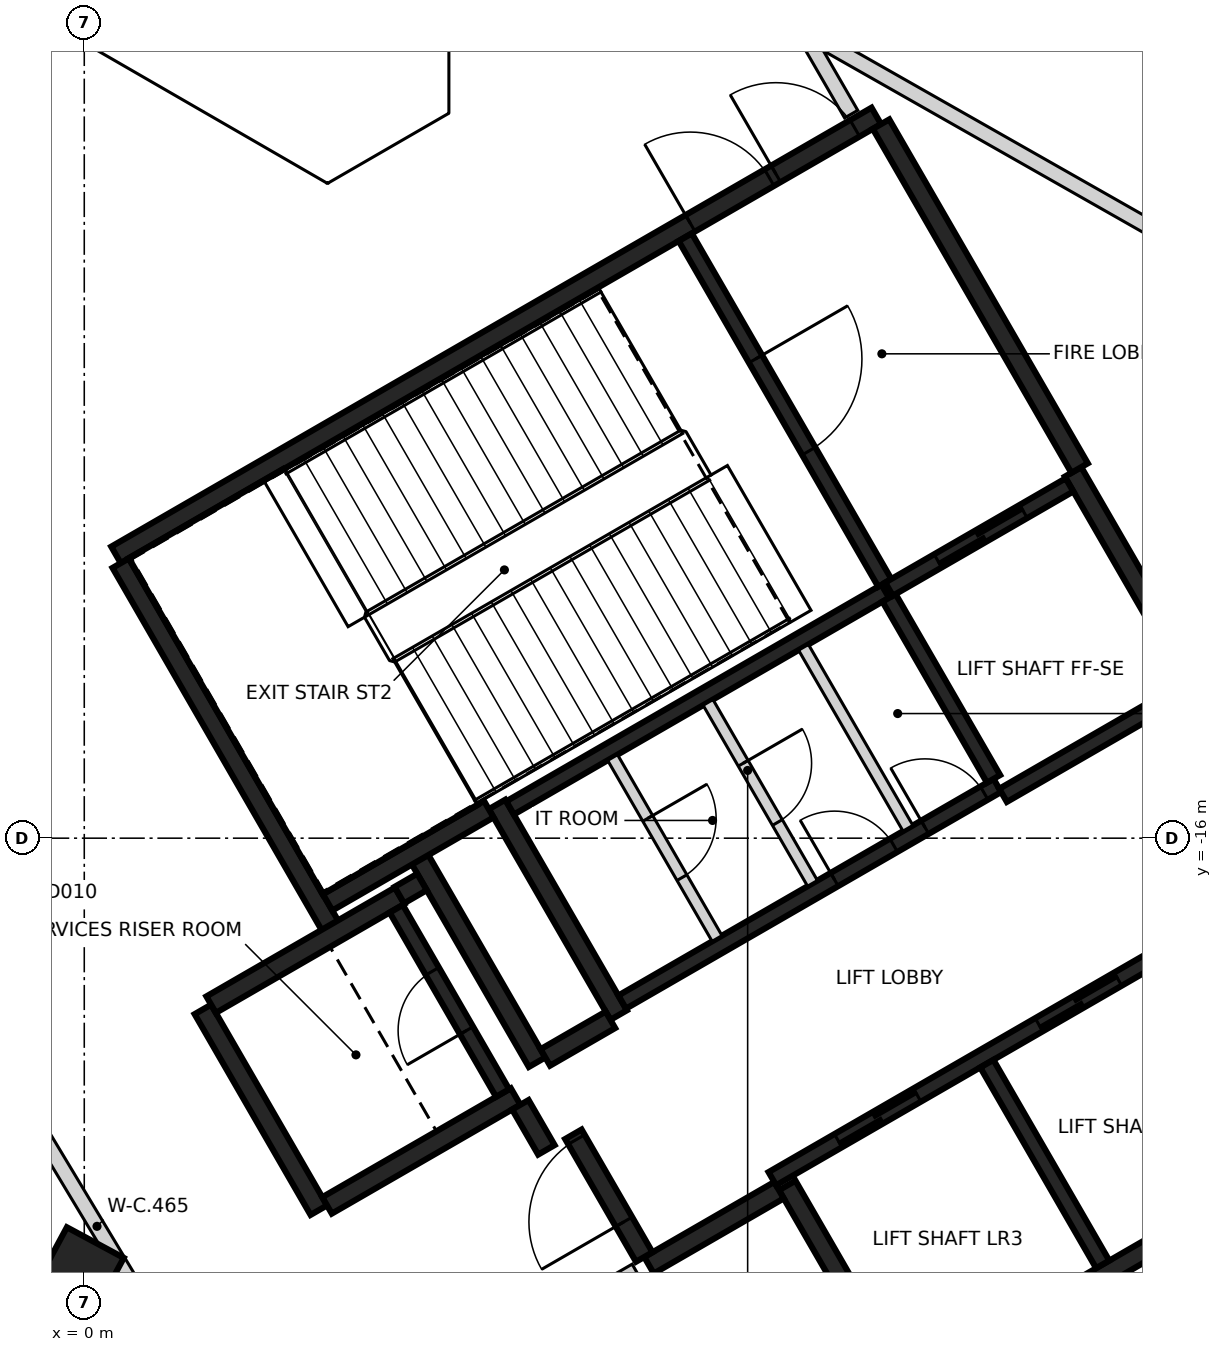
"""IFC4 building model, lengths in metres.
Left out: names, types, materials, properties, quantities, classifications, styles, units other than length and angle.
Written with IfcOpenShell. Run it as: python <this file> out.ifc"""

import sys

from ifc_helpers import new_model, si_unit, direction, frame, frame_2d, origin, origin_2d, place, context, subcontext, project, spatial, rectangle, extrude, element, fill, save


model = new_model("IFC4")
c1 = context("Model", 3, precision=1e-05, world=origin(), true_north=direction((0.0, 1.0)))
c2 = subcontext(c1, "Body", "Model", "MODEL_VIEW")
j1 = project(units=[si_unit("LENGTHUNIT", "METRE"), si_unit("PLANEANGLEUNIT", "RADIAN")], contexts=[c1])
p1 = place(None, origin())
s1 = spatial("IfcSite", under=j1, at=p1, CompositionType="ELEMENT")
p2 = place(p1, origin())
s2 = spatial("IfcBuilding", under=s1, at=p2, CompositionType="ELEMENT")
p3 = place(p2, frame((0.0, 0.0, 123.8)))
s3 = spatial("IfcBuildingStorey", under=s2, at=p3, CompositionType="ELEMENT", Elevation=123.8)
p4 = place(p3, frame((-0.151, -21.871, -0.4), z_axis=(0.0, 0.0, 1.0), x_axis=(0.47387612754, 0.880591514692, 0.0)))
e1 = element("IfcColumn", 1, at=p4, inside=s3, PredefinedType="COLUMN", context=c2, shape_type="SweptSolid", body=[
    extrude(rectangle(XDim=1.25, YDim=0.85, at=origin_2d()), origin(), (0.0, 0.0, 1.0), 5.0),
])
p5 = place(p3, frame((0.417, -12.273, 0.0), z_axis=(0.0, 0.0, 1.0), x_axis=(0.866021906294, 0.500006057782, 0.0)))
e2 = element("IfcWall", 2, at=p5, inside=s3, PredefinedType="SHEAR", context=c2, shape_type="SweptSolid", body=[
    extrude(rectangle(XDim=11.55, YDim=0.25, at=frame_2d((5.775, 0.0))), origin(), (0.0, 0.0, 1.0), 4.6),
])
p6 = place(p5, frame((10.025, 0.0, 0.0)))
e3 = element("IfcOpeningElement", 3, at=p6, cuts=e2, PredefinedType="OPENING", context=c2, shape_type="SweptSolid", body=[
    extrude(rectangle(XDim=1.2, YDim=2.1, at=frame_2d((0.6, 1.05))), frame((0.0, 0.135, 0.0), z_axis=(0.0, -1.0, 0.0), x_axis=(1.0, 0.0, 0.0)), (0.0, 0.0, 1.0), 0.27),
])
p7 = place(p5, frame((8.725, 0.0, 0.0)))
e4 = element("IfcOpeningElement", 4, at=p7, cuts=e2, PredefinedType="OPENING", context=c2, shape_type="SweptSolid", body=[
    extrude(rectangle(XDim=1.2, YDim=2.1, at=frame_2d((0.6, 1.05))), frame((0.0, 0.135, 0.0), z_axis=(0.0, -1.0, 0.0), x_axis=(1.0, 0.0, 0.0)), (0.0, 0.0, 1.0), 0.27),
])
p8 = place(p3, frame((13.008, -11.181, 0.0), z_axis=(0.0, 0.0, 1.0), x_axis=(0.500004234368, -0.866022959057, 0.0)))
e5 = element("IfcWall", 5, at=p8, inside=s3, PredefinedType="SHEAR", context=c2, shape_type="SweptSolid", body=[
    extrude(rectangle(XDim=6.25, YDim=0.25, at=frame_2d((3.125, 0.0))), origin(), (0.0, 0.0, 1.0), 4.6),
])
p9 = place(p3, frame((15.865, -20.328, 0.0), z_axis=(0.0, 0.0, 1.0), x_axis=(-0.86602852612, -0.499994591916, 0.0)))
e6 = element("IfcWall", 6, at=p9, inside=s3, PredefinedType="SHEAR", context=c2, shape_type="SweptSolid", body=[
    extrude(rectangle(XDim=5.85, YDim=0.25, at=frame_2d((2.925, 0.0))), origin(), (0.0, 0.0, 1.0), 4.6),
])
p10 = place(p3, frame((3.235, -17.153, 0.0), z_axis=(0.0, 0.0, 1.0), x_axis=(-0.500008851346, 0.866020293397, 0.0)))
e7 = element("IfcWall", 7, at=p10, inside=s3, PredefinedType="SHEAR", context=c2, shape_type="SweptSolid", body=[
    extrude(rectangle(XDim=5.51, YDim=0.25, at=frame_2d((2.755, 0.0))), origin(), (0.0, 0.0, 1.0), 4.6),
])
p11 = place(p3, frame((10.483, -6.606, 0.0), z_axis=(0.0, 0.0, 1.0), x_axis=(0.49999885962, -0.866026062182, 0.0)))
e8 = element("IfcWall", 8, at=p11, inside=s3, PredefinedType="SHEAR", context=c2, shape_type="SweptSolid", body=[
    extrude(rectangle(XDim=5.225, YDim=0.25, at=frame_2d((2.612, 0.0))), origin(), (0.0, 0.0, 1.0), 4.6),
])
p12 = place(p3, frame((7.031, -18.327, 0.0), z_axis=(0.0, 0.0, 1.0), x_axis=(-0.499971222258, 0.866042017984, 0.0)))
e9 = element("IfcWall", 9, at=p12, inside=s3, PredefinedType="SHEAR", context=c2, shape_type="SweptSolid", body=[
    extrude(rectangle(XDim=3.2, YDim=0.25, at=frame_2d((1.6, 0.0))), origin(), (0.0, 0.0, 1.0), 4.6),
])
p13 = place(p3, frame((10.736, -23.145, 0.0), z_axis=(0.0, 0.0, 1.0), x_axis=(-0.500023226632, 0.866011993467, 0.0)))
e10 = element("IfcWall", 10, at=p13, inside=s3, PredefinedType="SHEAR", context=c2, shape_type="SweptSolid", body=[
    extrude(rectangle(XDim=2.974, YDim=0.25, at=frame_2d((1.487, 0.0))), origin(), (0.0, 0.0, 1.0), 4.6),
])
p14 = place(p3, frame((3.085, -20.894, 0.0), z_axis=(0.0, 0.0, 1.0), x_axis=(-0.499978833458, 0.866037623948, 0.0)))
e11 = element("IfcWall", 11, at=p14, inside=s3, PredefinedType="SHEAR", context=c2, shape_type="SweptSolid", body=[
    extrude(rectangle(XDim=3.05, YDim=0.25, at=frame_2d((1.525, 0.0))), origin(), (0.0, 0.0, 1.0), 4.6),
])
p15 = place(p3, frame((1.669, -18.19, 0.0), z_axis=(0.0, 0.0, 1.0), x_axis=(0.866042235819, 0.499970844928, 0.0)))
e12 = element("IfcWall", 12, at=p15, inside=s3, PredefinedType="SHEAR", context=c2, shape_type="SweptSolid", body=[
    extrude(rectangle(XDim=2.865, YDim=0.25, at=frame_2d((1.432, 0.0))), origin(), (0.0, 0.0, 1.0), 4.6),
])
p16 = place(p3, frame((5.675, -19.399, 0.0), z_axis=(0.0, 0.0, 1.0), x_axis=(-0.866026637627, -0.499997862916, 0.0)))
e13 = element("IfcWall", 13, at=p16, inside=s3, PredefinedType="SHEAR", context=c2, shape_type="SweptSolid", body=[
    extrude(rectangle(XDim=2.865, YDim=0.25, at=frame_2d((1.432, 0.0))), origin(), (0.0, 0.0, 1.0), 4.6),
])
p17 = place(p3, frame((4.414, -16.276, 0.0), z_axis=(0.0, 0.0, 1.0), x_axis=(0.500003324108, -0.866023484601, 0.0)))
e14 = element("IfcWall", 14, at=p17, inside=s3, PredefinedType="SHEAR", context=c2, shape_type="SweptSolid", body=[
    extrude(rectangle(XDim=3.085, YDim=0.25, at=frame_2d((1.542, 0.0))), origin(), (0.0, 0.0, 1.0), 4.6),
])
p18 = place(p3, frame((5.322, -15.619, 0.0), z_axis=(0.0, 0.0, 1.0), x_axis=(-0.866026229868, -0.499998569178, 0.0)))
e15 = element("IfcWall", 15, at=p18, inside=s3, PredefinedType="SHEAR", context=c2, shape_type="SweptSolid", body=[
    extrude(rectangle(XDim=2.449, YDim=0.25, at=frame_2d((1.225, 0.0))), origin(), (0.0, 0.0, 1.0), 4.6),
])
p19 = place(p3, frame((9.14, -20.631, 0.0), z_axis=(0.0, 0.0, 1.0), x_axis=(-0.866043531843, -0.499968599967, 0.0)))
e16 = element("IfcWall", 16, at=p19, inside=s3, PredefinedType="SHEAR", context=c2, shape_type="SweptSolid", body=[
    extrude(rectangle(XDim=1.975, YDim=0.25, at=frame_2d((0.987, 0.0))), origin(), (0.0, 0.0, 1.0), 4.6),
])
p20 = place(p3, frame((7.367, -21.51, 0.0), z_axis=(0.0, 0.0, 1.0), x_axis=(-0.499983108224, 0.866035156036, 0.0)))
e17 = element("IfcWall", 17, at=p20, inside=s3, PredefinedType="SHEAR", context=c2, shape_type="SweptSolid", body=[
    extrude(rectangle(XDim=1.865, YDim=0.25, at=frame_2d((0.932, 0.0))), origin(), (0.0, 0.0, 1.0), 4.6),
])
p21 = place(p20, frame((0.535, 0.0, 0.0)))
e18 = element("IfcOpeningElement", 18, at=p21, cuts=e17, PredefinedType="OPENING", context=c2, shape_type="SweptSolid", body=[
    extrude(rectangle(XDim=1.25, YDim=2.1, at=frame_2d((0.625, 1.05))), frame((0.0, 0.135, 0.0), z_axis=(0.0, -1.0, 0.0), x_axis=(1.0, 0.0, 0.0)), (0.0, 0.0, 1.0), 0.27),
])
p22 = place(p3, frame((6.065, -18.885, 0.0), z_axis=(0.0, 0.0, 1.0), x_axis=(0.866017078145, 0.500014420154, 0.0)))
e19 = element("IfcWall", 19, at=p22, inside=s3, PredefinedType="SHEAR", context=c2, shape_type="SweptSolid", body=[
    extrude(rectangle(XDim=0.989, YDim=0.25, at=frame_2d((0.495, 0.0))), origin(), (0.0, 0.0, 1.0), 4.6),
])
p23 = place(p3, frame((6.08, -20.1, 0.0), z_axis=(0.0, 0.0, 1.0), x_axis=(-0.500051773299, 0.865995510393, 0.0)))
e20 = element("IfcWall", 20, at=p23, inside=s3, PredefinedType="SHEAR", context=c2, shape_type="SweptSolid", body=[
    extrude(rectangle(XDim=0.685, YDim=0.25, at=frame_2d((0.342, 0.0))), origin(), (0.0, 0.0, 1.0), 4.6),
])
p24 = place(p3, frame((4.145, -16.749, 0.0), z_axis=(0.0, 0.0, 1.0), x_axis=(0.866185586049, 0.49972245349, 0.0)))
e21 = element("IfcWall", 21, at=p24, inside=s3, PredefinedType="SHEAR", context=c2, shape_type="SweptSolid", body=[
    extrude(rectangle(XDim=0.344, YDim=0.25, at=frame_2d((0.172, 0.0))), origin(), (0.0, 0.0, 1.0), 4.6),
])
p25 = place(p3, frame((9.052, -20.48, 0.0), z_axis=(0.0, 0.0, 1.0), x_axis=(0.866030299012, 0.499991521122, 0.0)))
e22 = element("IfcWall", 22, at=p25, inside=s3, PredefinedType="SHEAR", context=c2, shape_type="SweptSolid", body=[
    extrude(rectangle(XDim=6.1, YDim=0.2, at=frame_2d((3.05, 0.0))), origin(), (0.0, 0.0, 1.0), 4.6),
])
p26 = place(p25, frame((1.0, 0.0, 0.0)))
e23 = element("IfcOpeningElement", 23, at=p26, cuts=e22, PredefinedType="OPENING", context=c2, shape_type="SweptSolid", body=[
    extrude(rectangle(XDim=1.2, YDim=2.1, at=frame_2d((0.6, 1.05))), frame((0.0, 0.11, 0.0), z_axis=(0.0, -1.0, 0.0), x_axis=(1.0, 0.0, 0.0)), (0.0, 0.0, 1.0), 0.22),
])
p27 = place(p25, frame((4.05, 0.0, 0.0)))
e24 = element("IfcOpeningElement", 24, at=p27, cuts=e22, PredefinedType="OPENING", context=c2, shape_type="SweptSolid", body=[
    extrude(rectangle(XDim=1.2, YDim=2.1, at=frame_2d((0.6, 1.05))), frame((0.0, 0.11, 0.0), z_axis=(0.0, -1.0, 0.0), x_axis=(1.0, 0.0, 0.0)), (0.0, 0.0, 1.0), 0.22),
])
p28 = place(p3, frame((10.538, -12.752, 0.0), z_axis=(0.0, 0.0, 1.0), x_axis=(-0.866038630372, -0.499977090179, 0.0)))
e25 = element("IfcWall", 25, at=p28, inside=s3, PredefinedType="SHEAR", context=c2, shape_type="SweptSolid", body=[
    extrude(rectangle(XDim=5.699, YDim=0.2, at=frame_2d((2.85, 0.0))), origin(), (0.0, 0.0, 1.0), 4.6),
])
p29 = place(p3, frame((7.077, -18.156, 0.0), z_axis=(0.0, 0.0, 1.0), x_axis=(0.866038630372, 0.499977090179, 0.0)))
e26 = element("IfcWall", 26, at=p29, inside=s3, PredefinedType="SHEAR", context=c2, shape_type="SweptSolid", body=[
    extrude(rectangle(XDim=5.699, YDim=0.2, at=frame_2d((2.85, 0.0))), origin(), (0.0, 0.0, 1.0), 4.6),
])
p30 = place(p29, frame((3.224, 0.0, 0.0)))
e27 = element("IfcOpeningElement", 27, at=p30, cuts=e26, PredefinedType="OPENING", context=c2, shape_type="SweptSolid", body=[
    extrude(rectangle(XDim=0.9, YDim=2.1, at=frame_2d((0.45, 1.05))), frame((0.0, 0.11, 0.0), z_axis=(0.0, -1.0, 0.0), x_axis=(1.0, 0.0, 0.0)), (0.0, 0.0, 1.0), 0.22),
])
p31 = place(p29, frame((4.599, 0.0, 0.0)))
e28 = element("IfcOpeningElement", 28, at=p31, cuts=e26, PredefinedType="OPENING", context=c2, shape_type="SweptSolid", body=[
    extrude(rectangle(XDim=0.9, YDim=2.1, at=frame_2d((0.45, 1.05))), frame((0.0, 0.11, 0.0), z_axis=(0.0, -1.0, 0.0), x_axis=(1.0, 0.0, 0.0)), (0.0, 0.0, 1.0), 0.22),
])
p32 = place(p3, frame((7.906, -8.094, 0.0), z_axis=(0.0, 0.0, 1.0), x_axis=(0.500024287448, -0.866011380966, 0.0)))
e29 = element("IfcWall", 29, at=p32, inside=s3, PredefinedType="SHEAR", context=c2, shape_type="SweptSolid", body=[
    extrude(rectangle(XDim=5.251, YDim=0.2, at=frame_2d((2.625, 0.0))), origin(), (0.0, 0.0, 1.0), 4.6),
])
p33 = place(p32, frame((1.849, 0.0, 0.0)))
e30 = element("IfcOpeningElement", 30, at=p33, cuts=e29, PredefinedType="OPENING", context=c2, shape_type="SweptSolid", body=[
    extrude(rectangle(XDim=1.4, YDim=2.1, at=frame_2d((0.7, 1.05))), frame((0.0, 0.11, 0.0), z_axis=(0.0, -1.0, 0.0), x_axis=(1.0, 0.0, 0.0)), (0.0, 0.0, 1.0), 0.22),
])
p34 = place(p3, frame((11.875, -18.967, 0.0), z_axis=(0.0, 0.0, 1.0), x_axis=(0.49998131003, -0.866036194175, 0.0)))
e31 = element("IfcWall", 31, at=p34, inside=s3, PredefinedType="SHEAR", context=c2, shape_type="SweptSolid", body=[
    extrude(rectangle(XDim=3.048, YDim=0.2, at=frame_2d((1.524, 0.0))), origin(), (0.0, 0.0, 1.0), 4.6),
])
p35 = place(p3, frame((5.503, -19.352, 0.0), z_axis=(0.0, 0.0, 1.0), x_axis=(-0.499986818241, 0.866033014143, 0.0)))
e32 = element("IfcWall", 32, at=p35, inside=s3, PredefinedType="SHEAR", context=c2, shape_type="SweptSolid", body=[
    extrude(rectangle(XDim=2.798, YDim=0.2, at=frame_2d((1.399, 0.0))), origin(), (0.0, 0.0, 1.0), 4.6),
])
p36 = place(p35, frame((0.949, 0.0, 0.0)))
e33 = element("IfcOpeningElement", 33, at=p36, cuts=e32, PredefinedType="OPENING", context=c2, shape_type="SweptSolid", body=[
    extrude(rectangle(XDim=0.9, YDim=2.1, at=frame_2d((0.45, 1.05))), frame((0.0, 0.11, 0.0), z_axis=(0.0, -1.0, 0.0), x_axis=(1.0, 0.0, 0.0)), (0.0, 0.0, 1.0), 0.22),
])
p37 = place(p3, frame((11.963, -15.22, 0.0), z_axis=(0.0, 0.0, 1.0), x_axis=(-0.500034990121, 0.866005201286, 0.0)))
e34 = element("IfcWall", 34, at=p37, inside=s3, PredefinedType="SHEAR", context=c2, shape_type="SweptSolid", body=[
    extrude(rectangle(XDim=2.75, YDim=0.2, at=frame_2d((1.375, 0.0))), origin(), (0.0, 0.0, 1.0), 4.6),
])
p38 = place(p3, frame((10.587, -12.723, 0.0), z_axis=(0.0, 0.0, 1.0), x_axis=(0.866037306777, 0.499979382845, 0.0)))
e35 = element("IfcWall", 35, at=p38, inside=s3, PredefinedType="SHEAR", context=c2, shape_type="SweptSolid", body=[
    extrude(rectangle(XDim=2.742, YDim=0.2, at=frame_2d((1.371, 0.0))), origin(), (0.0, 0.0, 1.0), 4.6),
])
p39 = place(p38, frame((0.743, 0.0, 0.0)))
e36 = element("IfcOpeningElement", 36, at=p39, cuts=e35, PredefinedType="OPENING", context=c2, shape_type="SweptSolid", body=[
    extrude(rectangle(XDim=1.3, YDim=2.1, at=frame_2d((0.65, 1.05))), frame((0.0, 0.11, 0.0), z_axis=(0.0, -1.0, 0.0), x_axis=(1.0, 0.0, 0.0)), (0.0, 0.0, 1.0), 0.22),
])
p40 = place(p3, frame((14.512, -14.037, 0.0), z_axis=(0.0, 0.0, 1.0), x_axis=(-0.866044696403, -0.499966582715, 0.0)))
e37 = element("IfcWall", 37, at=p40, inside=s3, PredefinedType="SHEAR", context=c2, shape_type="SweptSolid", body=[
    extrude(rectangle(XDim=2.799, YDim=0.2, at=frame_2d((1.399, 0.0))), origin(), (0.0, 0.0, 1.0), 4.6),
])
p41 = place(p3, frame((8.207, -14.214, 0.0), z_axis=(0.0, 0.0, 1.0), x_axis=(0.50002746344, -0.86600954718, 0.0)))
e38 = element("IfcWall", 38, at=p41, inside=s3, PredefinedType="PARTITIONING", context=c2, shape_type="SweptSolid", body=[
    extrude(rectangle(XDim=2.748, YDim=0.15, at=frame_2d((1.374, 0.0))), origin(), (0.0, 0.0, 1.0), 4.6),
])
p42 = place(p41, frame((0.924, 0.0, 0.0)))
e39 = element("IfcOpeningElement", 39, at=p42, cuts=e38, PredefinedType="OPENING", context=c2, shape_type="SweptSolid", body=[
    extrude(rectangle(XDim=0.9, YDim=2.1, at=frame_2d((0.45, 1.05))), frame((0.0, 0.085, 0.0), z_axis=(0.0, -1.0, 0.0), x_axis=(1.0, 0.0, 0.0)), (0.0, 0.0, 1.0), 0.17),
])
p43 = place(p3, frame((9.462, -13.489, 0.0), z_axis=(0.0, 0.0, 1.0), x_axis=(0.499988999718, -0.866031754707, 0.0)))
e40 = element("IfcWall", 40, at=p43, inside=s3, PredefinedType="PARTITIONING", context=c2, shape_type="SweptSolid", body=[
    extrude(rectangle(XDim=2.749, YDim=0.15, at=frame_2d((1.374, 0.0))), origin(), (0.0, 0.0, 1.0), 4.6),
])
p44 = place(p3, frame((6.951, -14.939, 0.0), z_axis=(0.0, 0.0, 1.0), x_axis=(0.499988999718, -0.866031754707, 0.0)))
e41 = element("IfcWall", 41, at=p44, inside=s3, PredefinedType="PARTITIONING", context=c2, shape_type="SweptSolid", body=[
    extrude(rectangle(XDim=2.749, YDim=0.15, at=frame_2d((1.374, 0.0))), origin(), (0.0, 0.0, 1.0), 4.6),
])
p45 = place(p44, frame((0.924, 0.0, 0.0)))
e42 = element("IfcOpeningElement", 42, at=p45, cuts=e41, PredefinedType="OPENING", context=c2, shape_type="SweptSolid", body=[
    extrude(rectangle(XDim=0.9, YDim=2.1, at=frame_2d((0.45, 1.05))), frame((0.0, 0.085, 0.0), z_axis=(0.0, -1.0, 0.0), x_axis=(1.0, 0.0, 0.0)), (0.0, 0.0, 1.0), 0.17),
])
p46 = place(p3, frame((-1.047, -19.086, 0.0), z_axis=(0.0, 0.0, 1.0), x_axis=(0.515211359032, -0.857063157255, 0.0)))
e43 = element("IfcWall", 43, at=p46, inside=s3, PredefinedType="PARTITIONING", context=c2, shape_type="SweptSolid", body=[
    extrude(rectangle(XDim=4.715, YDim=0.2, at=frame_2d((2.357, 0.0))), origin(), (0.0, 0.0, 1.0), 3.7),
])
p47 = place(p3, frame((6.056, -22.384, 0.0), z_axis=(0.0, 0.0, 1.0), x_axis=(0.866276386163, 0.499565033581, 0.0)))
e44 = element("IfcWall", 44, at=p47, inside=s3, PredefinedType="PARTITIONING", context=c2, shape_type="SweptSolid", body=[
    extrude(rectangle(XDim=1.387, YDim=0.2, at=frame_2d((0.694, 0.0))), origin(), (0.0, 0.0, 1.0), 4.6),
])
p48 = place(p3, frame((9.099, -4.76, 0.0), z_axis=(0.0, 0.0, 1.0), x_axis=(0.500195451667, -0.865912530301, 0.0)))
e45 = element("IfcWall", 45, at=p48, inside=s3, PredefinedType="PARTITIONING", context=c2, shape_type="SweptSolid", body=[
    extrude(rectangle(XDim=1.981, YDim=0.2, at=frame_2d((0.99, 0.0))), origin(), (0.0, 0.0, 1.0), 4.6),
])
p49 = place(p3, frame((9.454, -5.372, 0.0), z_axis=(0.0, 0.0, 1.0), x_axis=(0.869462257487, -0.493999375308, 0.0)))
e46 = element("IfcWall", 46, at=p49, inside=s3, PredefinedType="PARTITIONING", context=c2, shape_type="SweptSolid", body=[
    extrude(rectangle(XDim=12.543, YDim=0.2, at=frame_2d((6.271, 0.0))), origin(), (0.0, 0.0, 1.0), 4.6),
])
p50 = place(p39, origin())
e47 = element("IfcDoor", 47, at=p50, inside=s3, OperationType="SLIDING_TO_LEFT", PredefinedType="DOOR", context=c2, shape_type="SweptSolid", body=[
    extrude(rectangle(XDim=1.3, YDim=2.1, at=frame_2d((0.65, 1.05))), frame((0.0, 0.025, 0.0), z_axis=(0.0, -1.0, 0.0), x_axis=(1.0, 0.0, 0.0)), (0.0, 0.0, 1.0), 0.05),
])
fill(e36, e47)
p51 = place(p26, origin())
e48 = element("IfcDoor", 48, at=p51, inside=s3, OperationType="DOUBLE_DOOR_SLIDING", PredefinedType="DOOR", context=c2, shape_type="SweptSolid", body=[
    extrude(rectangle(XDim=1.2, YDim=2.1, at=frame_2d((0.6, 1.05))), frame((0.0, 0.025, 0.0), z_axis=(0.0, -1.0, 0.0), x_axis=(1.0, 0.0, 0.0)), (0.0, 0.0, 1.0), 0.05),
])
fill(e23, e48)
p52 = place(p27, origin())
e49 = element("IfcDoor", 49, at=p52, inside=s3, OperationType="DOUBLE_DOOR_SLIDING", PredefinedType="DOOR", context=c2, shape_type="SweptSolid", body=[
    extrude(rectangle(XDim=1.2, YDim=2.1, at=frame_2d((0.6, 1.05))), frame((0.0, 0.025, 0.0), z_axis=(0.0, -1.0, 0.0), x_axis=(1.0, 0.0, 0.0)), (0.0, 0.0, 1.0), 0.05),
])
fill(e24, e49)
p53 = place(p21, origin())
e50 = element("IfcDoor", 50, at=p53, inside=s3, OperationType="SINGLE_SWING_LEFT", PredefinedType="DOOR", context=c2, shape_type="SweptSolid", body=[
    extrude(rectangle(XDim=1.25, YDim=2.1, at=frame_2d((0.625, 1.05))), frame((0.0, 0.025, 0.0), z_axis=(0.0, -1.0, 0.0), x_axis=(1.0, 0.0, 0.0)), (0.0, 0.0, 1.0), 0.05),
])
fill(e18, e50)
p54 = place(p6, origin())
e51 = element("IfcDoor", 51, at=p54, inside=s3, OperationType="SINGLE_SWING_LEFT", PredefinedType="DOOR", context=c2, shape_type="SweptSolid", body=[
    extrude(rectangle(XDim=1.2, YDim=2.1, at=frame_2d((0.6, 1.05))), frame((0.0, 0.025, 0.0), z_axis=(0.0, -1.0, 0.0), x_axis=(1.0, 0.0, 0.0)), (0.0, 0.0, 1.0), 0.05),
])
fill(e3, e51)
p55 = place(p7, origin())
e52 = element("IfcDoor", 52, at=p55, inside=s3, OperationType="SINGLE_SWING_RIGHT", PredefinedType="DOOR", context=c2, shape_type="SweptSolid", body=[
    extrude(rectangle(XDim=1.2, YDim=2.1, at=frame_2d((0.6, 1.05))), frame((0.0, 0.025, 0.0), z_axis=(0.0, -1.0, 0.0), x_axis=(1.0, 0.0, 0.0)), (0.0, 0.0, 1.0), 0.05),
])
fill(e4, e52)
p56 = place(p33, origin())
e53 = element("IfcDoor", 53, at=p56, inside=s3, OperationType="SINGLE_SWING_LEFT", PredefinedType="DOOR", context=c2, shape_type="SweptSolid", body=[
    extrude(rectangle(XDim=1.4, YDim=2.1, at=frame_2d((0.7, 1.05))), frame((0.0, 0.025, 0.0), z_axis=(0.0, -1.0, 0.0), x_axis=(1.0, 0.0, 0.0)), (0.0, 0.0, 1.0), 0.05),
])
fill(e30, e53)
p57 = place(p30, origin())
e54 = element("IfcDoor", 54, at=p57, inside=s3, OperationType="SINGLE_SWING_RIGHT", PredefinedType="DOOR", context=c2, shape_type="SweptSolid", body=[
    extrude(rectangle(XDim=0.9, YDim=2.1, at=frame_2d((0.45, 1.05))), frame((0.0, 0.025, 0.0), z_axis=(0.0, -1.0, 0.0), x_axis=(1.0, 0.0, 0.0)), (0.0, 0.0, 1.0), 0.05),
])
fill(e27, e54)
p58 = place(p31, origin())
e55 = element("IfcDoor", 55, at=p58, inside=s3, OperationType="SINGLE_SWING_LEFT", PredefinedType="DOOR", context=c2, shape_type="SweptSolid", body=[
    extrude(rectangle(XDim=0.9, YDim=2.1, at=frame_2d((0.45, 1.05))), frame((0.0, 0.025, 0.0), z_axis=(0.0, -1.0, 0.0), x_axis=(1.0, 0.0, 0.0)), (0.0, 0.0, 1.0), 0.05),
])
fill(e28, e55)
p59 = place(p36, origin())
e56 = element("IfcDoor", 56, at=p59, inside=s3, OperationType="SINGLE_SWING_RIGHT", PredefinedType="DOOR", context=c2, shape_type="SweptSolid", body=[
    extrude(rectangle(XDim=0.9, YDim=2.1, at=frame_2d((0.45, 1.05))), frame((0.0, 0.025, 0.0), z_axis=(0.0, -1.0, 0.0), x_axis=(1.0, 0.0, 0.0)), (0.0, 0.0, 1.0), 0.05),
])
fill(e33, e56)
p60 = place(p42, origin())
e57 = element("IfcDoor", 57, at=p60, inside=s3, OperationType="SINGLE_SWING_LEFT", PredefinedType="DOOR", context=c2, shape_type="SweptSolid", body=[
    extrude(rectangle(XDim=0.9, YDim=2.1, at=frame_2d((0.45, 1.05))), frame((0.0, 0.025, 0.0), z_axis=(0.0, -1.0, 0.0), x_axis=(1.0, 0.0, 0.0)), (0.0, 0.0, 1.0), 0.05),
])
fill(e39, e57)
p61 = place(p45, origin())
e58 = element("IfcDoor", 58, at=p61, inside=s3, OperationType="SINGLE_SWING_RIGHT", PredefinedType="DOOR", context=c2, shape_type="SweptSolid", body=[
    extrude(rectangle(XDim=0.9, YDim=2.1, at=frame_2d((0.45, 1.05))), frame((0.0, 0.025, 0.0), z_axis=(0.0, -1.0, 0.0), x_axis=(1.0, 0.0, 0.0)), (0.0, 0.0, 1.0), 0.05),
])
fill(e42, e58)
save(model, sys.argv[1])
